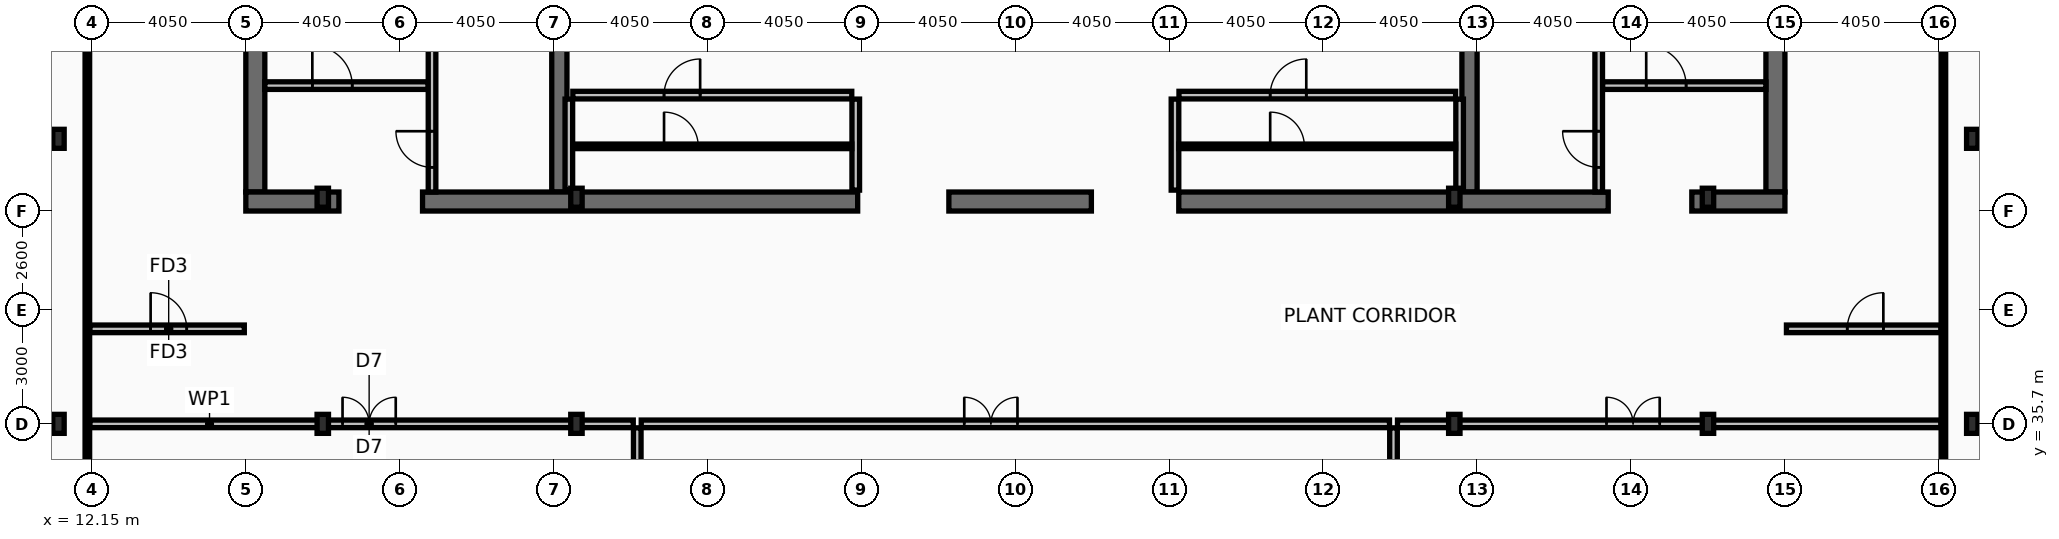
"""IFC4 building model, lengths in metres.
Left out: names, types, materials, properties, quantities, classifications, styles, units other than length and angle.
Written with IfcOpenShell. Run it as: python <this file> out.ifc"""

import sys

from ifc_helpers import new_model, si_unit, direction, frame, frame_2d, origin, origin_2d, place, context, subcontext, project, spatial, rectangle, i_section, extrude, element, fill, save


model = new_model("IFC4")
c1 = context("Model", 3, precision=1e-05, world=origin(), true_north=direction((0.0, 1.0)))
c2 = subcontext(c1, "Body", "Model", "MODEL_VIEW")
j1 = project(units=[si_unit("LENGTHUNIT", "METRE"), si_unit("PLANEANGLEUNIT", "RADIAN")], contexts=[c1])
p1 = place(None, origin())
s1 = spatial("IfcSite", under=j1, at=p1, CompositionType="ELEMENT")
p2 = place(p1, origin())
s2 = spatial("IfcBuilding", under=s1, at=p2, CompositionType="ELEMENT")
p3 = place(p2, frame((0.0, 0.0, 373.0)))
s3 = spatial("IfcBuildingStorey", under=s2, at=p3, CompositionType="ELEMENT", Elevation=373.0)
for number, where, z_axis, x_axis in (
    (1, (16.45, 41.8, 0.0), (0.0, 0.0, 1.0), (0.0, 1.0, 0.0)),
    (2, (56.45, 53.2, 0.0), (0.0, 0.0, 1.0), (0.0, -1.0, 0.0)),
):
    element("IfcWall", number, at=place(p3, frame(where, z_axis=z_axis, x_axis=x_axis)), inside=s3, PredefinedType="SHEAR", context=c2, shape_type="SweptSolid", body=[
        extrude(rectangle(XDim=11.4, YDim=0.5, at=frame_2d((5.7, 0.0))), origin(), (0.0, 0.0, 1.0), 5.4),
    ])
for number, where, z_axis, x_axis in (
    (3, (24.45, 41.8, 0.0), (0.0, 0.0, 1.0), (0.0, 1.0, 0.0)),
    (4, (48.4, 41.8, 0.0), (0.0, 0.0, 1.0), (0.0, 1.0, 0.0)),
):
    element("IfcWall", number, at=place(p3, frame(where, z_axis=z_axis, x_axis=x_axis)), inside=s3, PredefinedType="SHEAR", context=c2, shape_type="SweptSolid", body=[
        extrude(rectangle(XDim=11.4, YDim=0.4, at=frame_2d((5.7, 0.0))), origin(), (0.0, 0.0, 1.0), 5.4),
    ])
p4 = place(p3, frame((18.65, 41.55, 0.0), z_axis=(0.0, 0.0, 1.0), x_axis=(-1.0, 0.0, 0.0)))
e5 = element("IfcWall", 5, at=p4, inside=s3, PredefinedType="SHEAR", context=c2, shape_type="SweptSolid", body=[
    extrude(rectangle(XDim=2.45, YDim=0.5, at=frame_2d((1.225, 0.0))), origin(), (0.0, 0.0, 1.0), 5.4),
])
p5 = place(p3, frame((32.3, 41.55, 0.0), z_axis=(0.0, 0.0, 1.0), x_axis=(-1.0, 0.0, 0.0)))
e6 = element("IfcWall", 6, at=p5, inside=s3, PredefinedType="SHEAR", context=c2, shape_type="SweptSolid", body=[
    extrude(rectangle(XDim=11.45, YDim=0.5, at=frame_2d((5.725, 0.0))), origin(), (0.0, 0.0, 1.0), 5.4),
])
p6 = place(p3, frame((38.45, 41.55, 0.0), z_axis=(0.0, 0.0, 1.0), x_axis=(-1.0, 0.0, 0.0)))
e7 = element("IfcWall", 7, at=p6, inside=s3, PredefinedType="SHEAR", context=c2, shape_type="SweptSolid", body=[
    extrude(rectangle(XDim=3.75, YDim=0.5, at=frame_2d((1.875, 0.0))), origin(), (0.0, 0.0, 1.0), 5.4),
])
p7 = place(p3, frame((52.05, 41.55, 0.0), z_axis=(0.0, 0.0, 1.0), x_axis=(-1.0, 0.0, 0.0)))
e8 = element("IfcWall", 8, at=p7, inside=s3, PredefinedType="SHEAR", context=c2, shape_type="SweptSolid", body=[
    extrude(rectangle(XDim=11.3, YDim=0.5, at=frame_2d((5.65, 0.0))), origin(), (0.0, 0.0, 1.0), 5.4),
])
p8 = place(p3, frame((56.7, 41.55, 0.0), z_axis=(0.0, 0.0, 1.0), x_axis=(-1.0, 0.0, 0.0)))
e9 = element("IfcWall", 9, at=p8, inside=s3, PredefinedType="SHEAR", context=c2, shape_type="SweptSolid", body=[
    extrude(rectangle(XDim=2.45, YDim=0.5, at=frame_2d((1.225, 0.0))), origin(), (0.0, 0.0, 1.0), 5.4),
])
for number, where, z_axis, x_axis in (
    (10, (11.27, 35.7, 0.0), (0.0, 0.0, 1.0), (1.0, 0.0, 0.0)),
    (11, (11.27, 43.2, 0.0), (0.0, 0.0, 1.0), (1.0, 0.0, 0.0)),
    (12, (61.63, 35.7, 0.0), (0.0, 0.0, 1.0), (1.0, 0.0, 0.0)),
    (13, (61.63, 43.2, 0.0), (0.0, 0.0, 1.0), (1.0, 0.0, 0.0)),
    (14, (18.225, 35.7, 0.0), (0.0, 0.0, 1.0), (1.0, 0.0, 0.0)),
    (15, (18.225, 41.65, 0.0), (0.0, 0.0, 1.0), (1.0, 0.0, 0.0)),
    (16, (24.9, 35.7, 0.0), (0.0, 0.0, 1.0), (1.0, 0.0, 0.0)),
    (17, (24.9, 41.65, 0.0), (0.0, 0.0, 1.0), (1.0, 0.0, 0.0)),
    (18, (48.0, 35.7, 0.0), (0.0, 0.0, 1.0), (1.0, 0.0, 0.0)),
    (19, (48.0, 41.65, 0.0), (0.0, 0.0, 1.0), (1.0, 0.0, 0.0)),
    (20, (54.675, 35.7, 0.0), (0.0, 0.0, 1.0), (1.0, 0.0, 0.0)),
    (21, (54.675, 41.65, 0.0), (0.0, 0.0, 1.0), (1.0, 0.0, 0.0)),
):
    element("IfcColumn", number, at=place(p3, frame(where, z_axis=z_axis, x_axis=x_axis)), inside=s3, PredefinedType="COLUMN", context=c2, shape_type="SweptSolid", body=[
        extrude(i_section(OverallWidth=0.3, OverallDepth=0.5, WebThickness=0.014, FlangeThickness=0.028, at=origin_2d()), origin(), (0.0, 0.0, 1.0), 5.6),
    ])
p9 = place(p3, frame((16.7, 44.6, 0.0), z_axis=(0.0, 0.0, 1.0), x_axis=(1.0, 0.0, 0.0)))
e22 = element("IfcWall", 22, at=p9, inside=s3, PredefinedType="PARTITIONING", context=c2, shape_type="SweptSolid", body=[
    extrude(rectangle(XDim=4.3, YDim=0.2, at=frame_2d((2.15, 0.0))), origin(), (0.0, 0.0, 1.0), 5.4),
])
p10 = place(p9, frame((1.25, 0.0, 0.0)))
e23 = element("IfcOpeningElement", 23, at=p10, cuts=e22, PredefinedType="OPENING", context=c2, shape_type="SweptSolid", body=[
    extrude(rectangle(XDim=1.05, YDim=2.15, at=frame_2d((0.525, 1.075))), frame((0.0, 0.11, 0.0), z_axis=(0.0, -1.0, 0.0), x_axis=(1.0, 0.0, 0.0)), (0.0, 0.0, 1.0), 0.22),
])
p11 = place(p3, frame((21.1, 41.8, 0.0), z_axis=(0.0, 0.0, 1.0), x_axis=(0.0, 1.0, 0.0)))
e24 = element("IfcWall", 24, at=p11, inside=s3, PredefinedType="PARTITIONING", context=c2, shape_type="SweptSolid", body=[
    extrude(rectangle(XDim=4.215, YDim=0.2, at=frame_2d((2.107, 0.0))), origin(), (0.0, 0.0, 1.0), 5.4),
])
p12 = place(p11, frame((0.65, 0.0, 0.0)))
e25 = element("IfcOpeningElement", 25, at=p12, cuts=e24, PredefinedType="OPENING", context=c2, shape_type="SweptSolid", body=[
    extrude(rectangle(XDim=0.95, YDim=2.1, at=frame_2d((0.475, 1.05))), frame((0.0, 0.11, 0.0), z_axis=(0.0, -1.0, 0.0), x_axis=(1.0, 0.0, 0.0)), (0.0, 0.0, 1.0), 0.22),
])
p13 = place(p3, frame((51.9, 44.6, 0.0), z_axis=(0.0, 0.0, 1.0), x_axis=(1.0, 0.0, 0.0)))
e26 = element("IfcWall", 26, at=p13, inside=s3, PredefinedType="PARTITIONING", context=c2, shape_type="SweptSolid", body=[
    extrude(rectangle(XDim=4.3, YDim=0.2, at=frame_2d((2.15, 0.0))), origin(), (0.0, 0.0, 1.0), 5.4),
])
p14 = place(p13, frame((1.15, 0.0, 0.0)))
e27 = element("IfcOpeningElement", 27, at=p14, cuts=e26, PredefinedType="OPENING", context=c2, shape_type="SweptSolid", body=[
    extrude(rectangle(XDim=1.05, YDim=2.15, at=frame_2d((0.525, 1.075))), frame((0.0, 0.11, 0.0), z_axis=(0.0, -1.0, 0.0), x_axis=(1.0, 0.0, 0.0)), (0.0, 0.0, 1.0), 0.22),
])
p15 = place(p3, frame((51.8, 41.8, 0.0), z_axis=(0.0, 0.0, 1.0), x_axis=(0.0, 1.0, 0.0)))
e28 = element("IfcWall", 28, at=p15, inside=s3, PredefinedType="PARTITIONING", context=c2, shape_type="SweptSolid", body=[
    extrude(rectangle(XDim=4.215, YDim=0.2, at=frame_2d((2.107, 0.0))), origin(), (0.0, 0.0, 1.0), 5.4),
])
p16 = place(p15, frame((0.65, 0.0, 0.0)))
e29 = element("IfcOpeningElement", 29, at=p16, cuts=e28, PredefinedType="OPENING", context=c2, shape_type="SweptSolid", body=[
    extrude(rectangle(XDim=0.95, YDim=2.1, at=frame_2d((0.475, 1.05))), frame((0.0, 0.11, 0.0), z_axis=(0.0, -1.0, 0.0), x_axis=(1.0, 0.0, 0.0)), (0.0, 0.0, 1.0), 0.22),
])
for number, where, z_axis, x_axis in (
    (30, (24.7, 41.85, 0.0), (0.0, 0.0, 1.0), (0.0, 1.0, 0.0)),
    (31, (32.25, 41.85, 0.0), (0.0, 0.0, 1.0), (0.0, 1.0, 0.0)),
):
    element("IfcWall", number, at=place(p3, frame(where, z_axis=z_axis, x_axis=x_axis)), inside=s3, PredefinedType="PARTITIONING", context=c2, shape_type="SweptSolid", body=[
        extrude(rectangle(XDim=2.395, YDim=0.2, at=frame_2d((1.198, 0.0))), origin(), (0.0, 0.0, 1.0), 5.4),
    ])
p17 = place(p3, frame((24.805, 43.002, 0.0), z_axis=(0.0, 0.0, 1.0), x_axis=(1.0, 0.0, 0.0)))
e32 = element("IfcWall", 32, at=p17, inside=s3, PredefinedType="PARTITIONING", context=c2, shape_type="SweptSolid", body=[
    extrude(rectangle(XDim=7.34, YDim=0.12, at=frame_2d((3.67, 0.0))), origin(), (0.0, 0.0, 1.0), 5.4),
])
p18 = place(p17, frame((2.4, 0.0, 0.0)))
e33 = element("IfcOpeningElement", 33, at=p18, cuts=e32, PredefinedType="OPENING", context=c2, shape_type="SweptSolid", body=[
    extrude(rectangle(XDim=0.9, YDim=2.05, at=frame_2d((0.45, 1.025))), frame((0.0, 0.07, 0.0), z_axis=(0.0, -1.0, 0.0), x_axis=(1.0, 0.0, 0.0)), (0.0, 0.0, 1.0), 0.14),
])
p19 = place(p3, frame((24.805, 44.35, 0.0), z_axis=(0.0, 0.0, 1.0), x_axis=(1.0, 0.0, 0.0)))
e34 = element("IfcWall", 34, at=p19, inside=s3, PredefinedType="PARTITIONING", context=c2, shape_type="SweptSolid", body=[
    extrude(rectangle(XDim=7.34, YDim=0.2, at=frame_2d((3.67, 0.0))), origin(), (0.0, 0.0, 1.0), 5.4),
])
p20 = place(p19, frame((2.4, 0.0, 0.0)))
e35 = element("IfcOpeningElement", 35, at=p20, cuts=e34, PredefinedType="OPENING", context=c2, shape_type="SweptSolid", body=[
    extrude(rectangle(XDim=0.95, YDim=2.1, at=frame_2d((0.475, 1.05))), frame((0.0, 0.11, 0.0), z_axis=(0.0, -1.0, 0.0), x_axis=(1.0, 0.0, 0.0)), (0.0, 0.0, 1.0), 0.22),
])
for number, where, z_axis, x_axis in (
    (36, (40.65, 41.85, 0.0), (0.0, 0.0, 1.0), (0.0, 1.0, 0.0)),
    (37, (48.14, 41.85, 0.0), (0.0, 0.0, 1.0), (0.0, 1.0, 0.0)),
):
    element("IfcWall", number, at=place(p3, frame(where, z_axis=z_axis, x_axis=x_axis)), inside=s3, PredefinedType="PARTITIONING", context=c2, shape_type="SweptSolid", body=[
        extrude(rectangle(XDim=2.395, YDim=0.2, at=frame_2d((1.198, 0.0))), origin(), (0.0, 0.0, 1.0), 5.4),
    ])
p21 = place(p3, frame((40.755, 43.002, 0.0), z_axis=(0.0, 0.0, 1.0), x_axis=(1.0, 0.0, 0.0)))
e38 = element("IfcWall", 38, at=p21, inside=s3, PredefinedType="PARTITIONING", context=c2, shape_type="SweptSolid", body=[
    extrude(rectangle(XDim=7.28, YDim=0.12, at=frame_2d((3.64, 0.0))), origin(), (0.0, 0.0, 1.0), 5.4),
])
p22 = place(p21, frame((2.4, 0.0, 0.0)))
e39 = element("IfcOpeningElement", 39, at=p22, cuts=e38, PredefinedType="OPENING", context=c2, shape_type="SweptSolid", body=[
    extrude(rectangle(XDim=0.9, YDim=2.05, at=frame_2d((0.45, 1.025))), frame((0.0, 0.07, 0.0), z_axis=(0.0, -1.0, 0.0), x_axis=(1.0, 0.0, 0.0)), (0.0, 0.0, 1.0), 0.14),
])
p23 = place(p3, frame((40.755, 44.35, 0.0), z_axis=(0.0, 0.0, 1.0), x_axis=(1.0, 0.0, 0.0)))
e40 = element("IfcWall", 40, at=p23, inside=s3, PredefinedType="PARTITIONING", context=c2, shape_type="SweptSolid", body=[
    extrude(rectangle(XDim=7.28, YDim=0.2, at=frame_2d((3.64, 0.0))), origin(), (0.0, 0.0, 1.0), 5.4),
])
p24 = place(p23, frame((2.4, 0.0, 0.0)))
e41 = element("IfcOpeningElement", 41, at=p24, cuts=e40, PredefinedType="OPENING", context=c2, shape_type="SweptSolid", body=[
    extrude(rectangle(XDim=0.95, YDim=2.1, at=frame_2d((0.475, 1.05))), frame((0.0, 0.11, 0.0), z_axis=(0.0, -1.0, 0.0), x_axis=(1.0, 0.0, 0.0)), (0.0, 0.0, 1.0), 0.22),
])
p25 = place(p3, frame((12.095, 35.7, 0.0), z_axis=(0.0, 0.0, 1.0), x_axis=(1.0, 0.0, 0.0)))
e42 = element("IfcWall", 42, at=p25, inside=s3, PredefinedType="PARTITIONING", context=c2, shape_type="SweptSolid", body=[
    extrude(rectangle(XDim=14.3, YDim=0.2, at=frame_2d((7.15, 0.0))), origin(), (0.0, 0.0, 1.0), 4.79),
])
p26 = place(p25, frame((6.65, 0.0, 0.0)))
e43 = element("IfcOpeningElement", 43, at=p26, cuts=e42, PredefinedType="OPENING", context=c2, shape_type="SweptSolid", body=[
    extrude(rectangle(XDim=1.4, YDim=2.15, at=frame_2d((0.7, 1.075))), frame((0.0, 0.11, 0.0), z_axis=(0.0, -1.0, 0.0), x_axis=(1.0, 0.0, 0.0)), (0.0, 0.0, 1.0), 0.22),
])
p27 = place(p3, frame((26.605, 35.7, 0.0), z_axis=(0.0, 0.0, 1.0), x_axis=(1.0, 0.0, 0.0)))
e44 = element("IfcWall", 44, at=p27, inside=s3, PredefinedType="PARTITIONING", context=c2, shape_type="SweptSolid", body=[
    extrude(rectangle(XDim=19.69, YDim=0.2, at=frame_2d((9.845, 0.0))), origin(), (0.0, 0.0, 1.0), 5.03),
])
p28 = place(p27, frame((8.5, 0.0, 0.0)))
e45 = element("IfcOpeningElement", 45, at=p28, cuts=e44, PredefinedType="OPENING", context=c2, shape_type="SweptSolid", body=[
    extrude(rectangle(XDim=1.4, YDim=2.15, at=frame_2d((0.7, 1.075))), frame((0.0, 0.11, 0.0), z_axis=(0.0, -1.0, 0.0), x_axis=(1.0, 0.0, 0.0)), (0.0, 0.0, 1.0), 0.22),
])
p29 = place(p3, frame((46.505, 35.7, 0.0), z_axis=(0.0, 0.0, 1.0), x_axis=(1.0, 0.0, 0.0)))
e46 = element("IfcWall", 46, at=p29, inside=s3, PredefinedType="PARTITIONING", context=c2, shape_type="SweptSolid", body=[
    extrude(rectangle(XDim=14.3, YDim=0.2, at=frame_2d((7.15, 0.0))), origin(), (0.0, 0.0, 1.0), 4.79),
])
p30 = place(p29, frame((5.5, 0.0, 0.0)))
e47 = element("IfcOpeningElement", 47, at=p30, cuts=e46, PredefinedType="OPENING", context=c2, shape_type="SweptSolid", body=[
    extrude(rectangle(XDim=1.4, YDim=2.15, at=frame_2d((0.7, 1.075))), frame((0.0, 0.11, 0.0), z_axis=(0.0, -1.0, 0.0), x_axis=(1.0, 0.0, 0.0)), (0.0, 0.0, 1.0), 0.22),
])
for number, where, z_axis, x_axis in (
    (48, (26.5, 10.665, 0.0), (0.0, 0.0, 1.0), (0.0, 1.0, 0.0)),
    (49, (46.4, 10.665, 0.0), (0.0, 0.0, 1.0), (0.0, 1.0, 0.0)),
):
    element("IfcWall", number, at=place(p3, frame(where, z_axis=z_axis, x_axis=x_axis)), inside=s3, PredefinedType="PARTITIONING", context=c2, shape_type="SweptSolid", body=[
        extrude(rectangle(XDim=24.93, YDim=0.2, at=frame_2d((12.465, 0.0))), origin(), (0.0, 0.0, 1.0), 5.03),
    ])
p31 = place(p3, frame((12.095, 38.2, 0.0), z_axis=(0.0, 0.0, 1.0), x_axis=(1.0, 0.0, 0.0)))
e50 = element("IfcWall", 50, at=p31, inside=s3, PredefinedType="PARTITIONING", context=c2, shape_type="SweptSolid", body=[
    extrude(rectangle(XDim=4.065, YDim=0.2, at=frame_2d((2.032, 0.0))), origin(), (0.0, 0.0, 1.0), 5.4),
])
p32 = place(p31, frame((1.6, 0.0, 0.0)))
e51 = element("IfcOpeningElement", 51, at=p32, cuts=e50, PredefinedType="OPENING", context=c2, shape_type="SweptSolid", body=[
    extrude(rectangle(XDim=0.95, YDim=2.1, at=frame_2d((0.475, 1.05))), frame((0.0, 0.11, 0.0), z_axis=(0.0, -1.0, 0.0), x_axis=(1.0, 0.0, 0.0)), (0.0, 0.0, 1.0), 0.22),
])
p33 = place(p3, frame((56.74, 38.2, 0.0), z_axis=(0.0, 0.0, 1.0), x_axis=(1.0, 0.0, 0.0)))
e52 = element("IfcWall", 52, at=p33, inside=s3, PredefinedType="PARTITIONING", context=c2, shape_type="SweptSolid", body=[
    extrude(rectangle(XDim=4.065, YDim=0.2, at=frame_2d((2.032, 0.0))), origin(), (0.0, 0.0, 1.0), 5.4),
])
p34 = place(p33, frame((1.6, 0.0, 0.0)))
e53 = element("IfcOpeningElement", 53, at=p34, cuts=e52, PredefinedType="OPENING", context=c2, shape_type="SweptSolid", body=[
    extrude(rectangle(XDim=0.95, YDim=2.1, at=frame_2d((0.475, 1.05))), frame((0.0, 0.11, 0.0), z_axis=(0.0, -1.0, 0.0), x_axis=(1.0, 0.0, 0.0)), (0.0, 0.0, 1.0), 0.22),
])
for number, where, z_axis, x_axis in (
    (54, (12.03, 10.665, 0.0), (0.0, 0.0, 1.0), (0.0, 1.0, 0.0)),
    (55, (60.87, 10.665, 0.0), (0.0, 0.0, 1.0), (0.0, 1.0, 0.0)),
):
    element("IfcWall", number, at=place(p3, frame(where, z_axis=z_axis, x_axis=x_axis)), inside=s3, PredefinedType="PARTITIONING", context=c2, shape_type="SweptSolid", body=[
        extrude(rectangle(XDim=42.11, YDim=0.12, at=frame_2d((21.055, 0.0))), origin(), (0.0, 0.0, 1.0), 4.79),
    ])
p35 = place(p10, origin())
e56 = element("IfcDoor", 56, at=p35, inside=s3, OperationType="SINGLE_SWING_LEFT", PredefinedType="DOOR", context=c2, shape_type="SweptSolid", body=[
    extrude(rectangle(XDim=1.05, YDim=2.15, at=frame_2d((0.525, 1.075))), frame((0.0, 0.025, 0.0), z_axis=(0.0, -1.0, 0.0), x_axis=(1.0, 0.0, 0.0)), (0.0, 0.0, 1.0), 0.05),
])
fill(e23, e56)
p36 = place(p12, origin())
e57 = element("IfcDoor", 57, at=p36, inside=s3, OperationType="SINGLE_SWING_RIGHT", PredefinedType="DOOR", context=c2, shape_type="SweptSolid", body=[
    extrude(rectangle(XDim=0.95, YDim=2.1, at=frame_2d((0.475, 1.05))), frame((0.0, 0.025, 0.0), z_axis=(0.0, -1.0, 0.0), x_axis=(1.0, 0.0, 0.0)), (0.0, 0.0, 1.0), 0.05),
])
fill(e25, e57)
p37 = place(p14, origin())
e58 = element("IfcDoor", 58, at=p37, inside=s3, OperationType="SINGLE_SWING_LEFT", PredefinedType="DOOR", context=c2, shape_type="SweptSolid", body=[
    extrude(rectangle(XDim=1.05, YDim=2.15, at=frame_2d((0.525, 1.075))), frame((0.0, 0.025, 0.0), z_axis=(0.0, -1.0, 0.0), x_axis=(1.0, 0.0, 0.0)), (0.0, 0.0, 1.0), 0.05),
])
fill(e27, e58)
p38 = place(p16, origin())
e59 = element("IfcDoor", 59, at=p38, inside=s3, OperationType="SINGLE_SWING_RIGHT", PredefinedType="DOOR", context=c2, shape_type="SweptSolid", body=[
    extrude(rectangle(XDim=0.95, YDim=2.1, at=frame_2d((0.475, 1.05))), frame((0.0, 0.025, 0.0), z_axis=(0.0, -1.0, 0.0), x_axis=(1.0, 0.0, 0.0)), (0.0, 0.0, 1.0), 0.05),
])
fill(e29, e59)
p39 = place(p18, origin())
e60 = element("IfcDoor", 60, at=p39, inside=s3, OperationType="SINGLE_SWING_LEFT", PredefinedType="DOOR", context=c2, shape_type="SweptSolid", body=[
    extrude(rectangle(XDim=0.9, YDim=2.05, at=frame_2d((0.45, 1.025))), frame((0.0, 0.025, 0.0), z_axis=(0.0, -1.0, 0.0), x_axis=(1.0, 0.0, 0.0)), (0.0, 0.0, 1.0), 0.05),
])
fill(e33, e60)
p40 = place(p20, origin())
e61 = element("IfcDoor", 61, at=p40, inside=s3, OperationType="SINGLE_SWING_RIGHT", PredefinedType="DOOR", context=c2, shape_type="SweptSolid", body=[
    extrude(rectangle(XDim=0.95, YDim=2.1, at=frame_2d((0.475, 1.05))), frame((0.0, 0.025, 0.0), z_axis=(0.0, -1.0, 0.0), x_axis=(1.0, 0.0, 0.0)), (0.0, 0.0, 1.0), 0.05),
])
fill(e35, e61)
p41 = place(p22, origin())
e62 = element("IfcDoor", 62, at=p41, inside=s3, OperationType="SINGLE_SWING_LEFT", PredefinedType="DOOR", context=c2, shape_type="SweptSolid", body=[
    extrude(rectangle(XDim=0.9, YDim=2.05, at=frame_2d((0.45, 1.025))), frame((0.0, 0.025, 0.0), z_axis=(0.0, -1.0, 0.0), x_axis=(1.0, 0.0, 0.0)), (0.0, 0.0, 1.0), 0.05),
])
fill(e39, e62)
p42 = place(p24, origin())
e63 = element("IfcDoor", 63, at=p42, inside=s3, OperationType="SINGLE_SWING_RIGHT", PredefinedType="DOOR", context=c2, shape_type="SweptSolid", body=[
    extrude(rectangle(XDim=0.95, YDim=2.1, at=frame_2d((0.475, 1.05))), frame((0.0, 0.025, 0.0), z_axis=(0.0, -1.0, 0.0), x_axis=(1.0, 0.0, 0.0)), (0.0, 0.0, 1.0), 0.05),
])
fill(e41, e63)
p43 = place(p26, origin())
e64 = element("IfcDoor", 64, at=p43, inside=s3, OperationType="DOUBLE_DOOR_SINGLE_SWING", PredefinedType="DOOR", context=c2, shape_type="SweptSolid", body=[
    extrude(rectangle(XDim=1.4, YDim=2.15, at=frame_2d((0.7, 1.075))), frame((0.0, 0.025, 0.0), z_axis=(0.0, -1.0, 0.0), x_axis=(1.0, 0.0, 0.0)), (0.0, 0.0, 1.0), 0.05),
])
fill(e43, e64)
p44 = place(p28, origin())
e65 = element("IfcDoor", 65, at=p44, inside=s3, OperationType="DOUBLE_DOOR_SINGLE_SWING", PredefinedType="DOOR", context=c2, shape_type="SweptSolid", body=[
    extrude(rectangle(XDim=1.4, YDim=2.15, at=frame_2d((0.7, 1.075))), frame((0.0, 0.025, 0.0), z_axis=(0.0, -1.0, 0.0), x_axis=(1.0, 0.0, 0.0)), (0.0, 0.0, 1.0), 0.05),
])
fill(e45, e65)
p45 = place(p30, origin())
e66 = element("IfcDoor", 66, at=p45, inside=s3, OperationType="DOUBLE_DOOR_SINGLE_SWING", PredefinedType="DOOR", context=c2, shape_type="SweptSolid", body=[
    extrude(rectangle(XDim=1.4, YDim=2.15, at=frame_2d((0.7, 1.075))), frame((0.0, 0.025, 0.0), z_axis=(0.0, -1.0, 0.0), x_axis=(1.0, 0.0, 0.0)), (0.0, 0.0, 1.0), 0.05),
])
fill(e47, e66)
p46 = place(p32, origin())
e67 = element("IfcDoor", 67, at=p46, inside=s3, OperationType="SINGLE_SWING_LEFT", PredefinedType="DOOR", context=c2, shape_type="SweptSolid", body=[
    extrude(rectangle(XDim=0.95, YDim=2.1, at=frame_2d((0.475, 1.05))), frame((0.0, 0.025, 0.0), z_axis=(0.0, -1.0, 0.0), x_axis=(1.0, 0.0, 0.0)), (0.0, 0.0, 1.0), 0.05),
])
fill(e51, e67)
p47 = place(p34, origin())
e68 = element("IfcDoor", 68, at=p47, inside=s3, OperationType="SINGLE_SWING_RIGHT", PredefinedType="DOOR", context=c2, shape_type="SweptSolid", body=[
    extrude(rectangle(XDim=0.95, YDim=2.1, at=frame_2d((0.475, 1.05))), frame((0.0, 0.025, 0.0), z_axis=(0.0, -1.0, 0.0), x_axis=(1.0, 0.0, 0.0)), (0.0, 0.0, 1.0), 0.05),
])
fill(e53, e68)
save(model, sys.argv[1])
